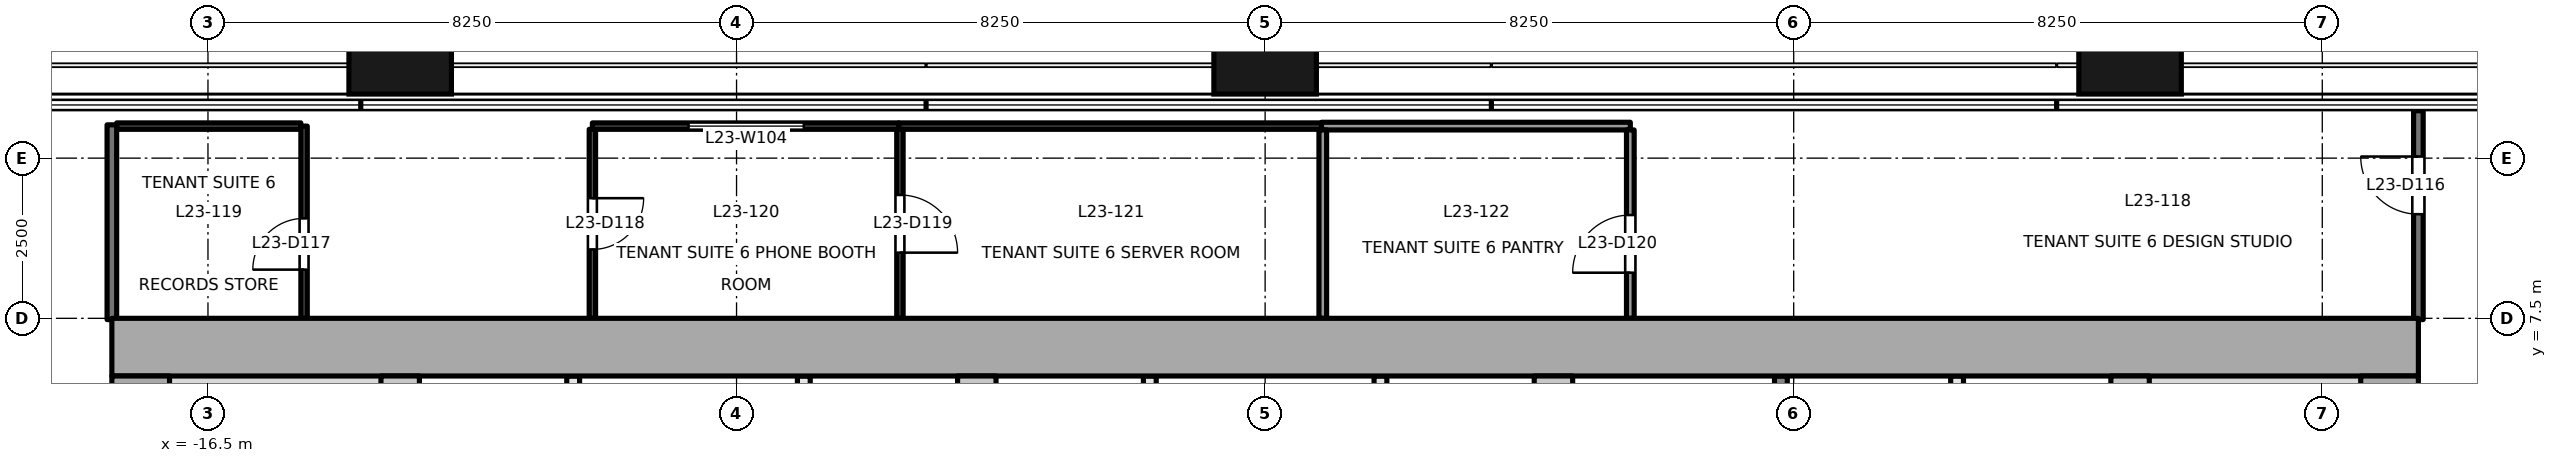
"""IFC4 building model, lengths in metres.
Left out: names, types, materials, properties, quantities, classifications, styles, units other than length and angle.
Written with IfcOpenShell. Run it as: python <this file> out.ifc"""

import sys

from ifc_helpers import new_model, si_unit, direction, frame, frame_2d, origin, origin_2d, place, context, subcontext, project, spatial, rectangle, extrude, element, fill, save


model = new_model("IFC4")
c1 = context("Model", 3, precision=1e-05, world=origin(), true_north=direction((0.0, 1.0)))
c2 = subcontext(c1, "Body", "Model", "MODEL_VIEW")
j1 = project(units=[si_unit("LENGTHUNIT", "METRE"), si_unit("PLANEANGLEUNIT", "RADIAN")], contexts=[c1])
p1 = place(None, origin())
s1 = spatial("IfcSite", under=j1, at=p1, CompositionType="ELEMENT")
p2 = place(p1, origin())
s2 = spatial("IfcBuilding", under=s1, at=p2, CompositionType="ELEMENT")
p3 = place(p2, frame((0.0, 0.0, 103.7)))
s3 = spatial("IfcBuildingStorey", under=s2, at=p3, CompositionType="ELEMENT", Elevation=103.7)
for number, where, z_axis, x_axis in (
    (1, (-13.5, 11.9, -0.2), (0.0, 0.0, 1.0), (1.0, 0.0, 0.0)),
    (2, (0.0, 11.9, -0.2), (0.0, 0.0, 1.0), (1.0, 0.0, 0.0)),
    (3, (13.5, 11.9, -0.2), (0.0, 0.0, 1.0), (1.0, 0.0, 0.0)),
):
    element("IfcColumn", number, at=place(p3, frame(where, z_axis=z_axis, x_axis=x_axis)), inside=s3, PredefinedType="COLUMN", context=c2, shape_type="SweptSolid", body=[
        extrude(rectangle(XDim=1.6, YDim=1.8, at=origin_2d()), origin(), (0.0, 0.0, 1.0), 4.0),
    ])
p4 = place(p3, frame((-18.0, 7.05, -0.2), z_axis=(0.0, 0.0, 1.0), x_axis=(1.0, 0.0, 0.0)))
e4 = element("IfcWall", 4, at=p4, inside=s3, PredefinedType="SHEAR", context=c2, shape_type="SweptSolid", body=[
    extrude(rectangle(XDim=36.0, YDim=0.9, at=frame_2d((18.0, 0.0))), origin(), (0.0, 0.0, 1.0), 4.0),
])
p5 = place(p3, frame((-17.55, -6.6, -0.2), z_axis=(0.0, 0.0, 1.0), x_axis=(0.0, 1.0, 0.0)))
e5 = element("IfcWall", 5, at=p5, inside=s3, PredefinedType="SHEAR", context=c2, shape_type="SweptSolid", body=[
    extrude(rectangle(XDim=13.2, YDim=0.9, at=frame_2d((6.6, 0.0))), origin(), (0.0, 0.0, 1.0), 4.0),
])
p6 = place(p5, frame((4.55, 0.0, 0.2)))
e6 = element("IfcOpeningElement", 6, at=p6, cuts=e5, PredefinedType="OPENING", context=c2, shape_type="SweptSolid", body=[
    extrude(rectangle(XDim=1.2, YDim=2.1, at=frame_2d((0.6, 1.05))), frame((0.0, 0.46, 0.0), z_axis=(0.0, -1.0, 0.0), x_axis=(1.0, 0.0, 0.0)), (0.0, 0.0, 1.0), 0.921),
])
p7 = place(p3, frame((17.55, -6.6, -0.2), z_axis=(0.0, 0.0, 1.0), x_axis=(0.0, 1.0, 0.0)))
e7 = element("IfcWall", 7, at=p7, inside=s3, PredefinedType="SHEAR", context=c2, shape_type="SweptSolid", body=[
    extrude(rectangle(XDim=13.2, YDim=0.9, at=frame_2d((6.6, 0.0))), origin(), (0.0, 0.0, 1.0), 4.0),
])
p8 = place(p7, frame((4.55, 0.0, 0.2)))
e8 = element("IfcOpeningElement", 8, at=p8, cuts=e7, PredefinedType="OPENING", context=c2, shape_type="SweptSolid", body=[
    extrude(rectangle(XDim=1.2, YDim=2.1, at=frame_2d((0.6, 1.05))), frame((0.0, 0.46, 0.0), z_axis=(0.0, -1.0, 0.0), x_axis=(1.0, 0.0, 0.0)), (0.0, 0.0, 1.0), 0.921),
])
for number, where, z_axis, x_axis in (
    (9, (-13.5, -6.6, -0.2), (0.0, 0.0, 1.0), (0.0, 1.0, 0.0)),
    (10, (-4.5, -6.6, -0.2), (0.0, 0.0, 1.0), (0.0, 1.0, 0.0)),
    (11, (4.5, -6.6, -0.2), (0.0, 0.0, 1.0), (0.0, 1.0, 0.0)),
    (12, (13.5, -6.6, -0.2), (0.0, 0.0, 1.0), (0.0, 1.0, 0.0)),
):
    element("IfcWall", number, at=place(p3, frame(where, z_axis=z_axis, x_axis=x_axis)), inside=s3, PredefinedType="SHEAR", context=c2, shape_type="SweptSolid", body=[
        extrude(rectangle(XDim=13.2, YDim=0.6, at=frame_2d((6.6, 0.0))), origin(), (0.0, 0.0, 1.0), 4.0),
    ])
p9 = place(p3, frame((-10.8, -6.6, 0.0), z_axis=(0.0, 0.0, 1.0), x_axis=(0.0, 1.0, 0.0)))
e13 = element("IfcWall", 13, at=p9, inside=s3, PredefinedType="PARTITIONING", context=c2, shape_type="SweptSolid", body=[
    extrude(rectangle(XDim=13.2, YDim=0.2, at=frame_2d((6.6, 0.0))), origin(), (0.0, 0.0, 1.0), 3.8),
])
p10 = place(p9, frame((0.55, 0.0, 0.0)))
e14 = element("IfcOpeningElement", 14, at=p10, cuts=e13, PredefinedType="OPENING", context=c2, shape_type="SweptSolid", body=[
    extrude(rectangle(XDim=0.9, YDim=2.1, at=frame_2d((0.45, 1.05))), frame((0.0, 0.111, 0.0), z_axis=(0.0, -1.0, 0.0), x_axis=(1.0, 0.0, 0.0)), (0.0, 0.0, 1.0), 0.221),
])
p11 = place(p9, frame((2.9, 0.0, 0.0)))
e15 = element("IfcOpeningElement", 15, at=p11, cuts=e13, PredefinedType="OPENING", context=c2, shape_type="SweptSolid", body=[
    extrude(rectangle(XDim=1.2, YDim=2.1, at=frame_2d((0.6, 1.05))), frame((0.0, 0.111, 0.0), z_axis=(0.0, -1.0, 0.0), x_axis=(1.0, 0.0, 0.0)), (0.0, 0.0, 1.0), 0.221),
])
p12 = place(p9, frame((5.7, 0.0, 0.0)))
e16 = element("IfcOpeningElement", 16, at=p12, cuts=e13, PredefinedType="OPENING", context=c2, shape_type="SweptSolid", body=[
    extrude(rectangle(XDim=1.2, YDim=2.1, at=frame_2d((0.6, 1.05))), frame((0.0, 0.111, 0.0), z_axis=(0.0, -1.0, 0.0), x_axis=(1.0, 0.0, 0.0)), (0.0, 0.0, 1.0), 0.221),
])
p13 = place(p9, frame((8.5, 0.0, 0.0)))
e17 = element("IfcOpeningElement", 17, at=p13, cuts=e13, PredefinedType="OPENING", context=c2, shape_type="SweptSolid", body=[
    extrude(rectangle(XDim=1.2, YDim=2.1, at=frame_2d((0.6, 1.05))), frame((0.0, 0.111, 0.0), z_axis=(0.0, -1.0, 0.0), x_axis=(1.0, 0.0, 0.0)), (0.0, 0.0, 1.0), 0.221),
])
p14 = place(p9, frame((11.3, 0.0, 0.0)))
e18 = element("IfcOpeningElement", 18, at=p14, cuts=e13, PredefinedType="OPENING", context=c2, shape_type="SweptSolid", body=[
    extrude(rectangle(XDim=1.2, YDim=2.1, at=frame_2d((0.6, 1.05))), frame((0.0, 0.111, 0.0), z_axis=(0.0, -1.0, 0.0), x_axis=(1.0, 0.0, 0.0)), (0.0, 0.0, 1.0), 0.221),
])
p15 = place(p3, frame((-7.2, -6.6, 0.0), z_axis=(0.0, 0.0, 1.0), x_axis=(0.0, 1.0, 0.0)))
e19 = element("IfcWall", 19, at=p15, inside=s3, PredefinedType="PARTITIONING", context=c2, shape_type="SweptSolid", body=[
    extrude(rectangle(XDim=13.2, YDim=0.2, at=frame_2d((6.6, 0.0))), origin(), (0.0, 0.0, 1.0), 3.8),
])
p16 = place(p15, frame((0.55, 0.0, 0.0)))
e20 = element("IfcOpeningElement", 20, at=p16, cuts=e19, PredefinedType="OPENING", context=c2, shape_type="SweptSolid", body=[
    extrude(rectangle(XDim=0.9, YDim=2.1, at=frame_2d((0.45, 1.05))), frame((0.0, 0.111, 0.0), z_axis=(0.0, -1.0, 0.0), x_axis=(1.0, 0.0, 0.0)), (0.0, 0.0, 1.0), 0.221),
])
p17 = place(p15, frame((2.9, 0.0, 0.0)))
e21 = element("IfcOpeningElement", 21, at=p17, cuts=e19, PredefinedType="OPENING", context=c2, shape_type="SweptSolid", body=[
    extrude(rectangle(XDim=1.2, YDim=2.1, at=frame_2d((0.6, 1.05))), frame((0.0, 0.111, 0.0), z_axis=(0.0, -1.0, 0.0), x_axis=(1.0, 0.0, 0.0)), (0.0, 0.0, 1.0), 0.221),
])
p18 = place(p15, frame((5.7, 0.0, 0.0)))
e22 = element("IfcOpeningElement", 22, at=p18, cuts=e19, PredefinedType="OPENING", context=c2, shape_type="SweptSolid", body=[
    extrude(rectangle(XDim=1.2, YDim=2.1, at=frame_2d((0.6, 1.05))), frame((0.0, 0.111, 0.0), z_axis=(0.0, -1.0, 0.0), x_axis=(1.0, 0.0, 0.0)), (0.0, 0.0, 1.0), 0.221),
])
p19 = place(p15, frame((8.5, 0.0, 0.0)))
e23 = element("IfcOpeningElement", 23, at=p19, cuts=e19, PredefinedType="OPENING", context=c2, shape_type="SweptSolid", body=[
    extrude(rectangle(XDim=1.2, YDim=2.1, at=frame_2d((0.6, 1.05))), frame((0.0, 0.111, 0.0), z_axis=(0.0, -1.0, 0.0), x_axis=(1.0, 0.0, 0.0)), (0.0, 0.0, 1.0), 0.221),
])
p20 = place(p15, frame((11.3, 0.0, 0.0)))
e24 = element("IfcOpeningElement", 24, at=p20, cuts=e19, PredefinedType="OPENING", context=c2, shape_type="SweptSolid", body=[
    extrude(rectangle(XDim=1.2, YDim=2.1, at=frame_2d((0.6, 1.05))), frame((0.0, 0.111, 0.0), z_axis=(0.0, -1.0, 0.0), x_axis=(1.0, 0.0, 0.0)), (0.0, 0.0, 1.0), 0.221),
])
p21 = place(p3, frame((-1.8, -6.6, 0.0), z_axis=(0.0, 0.0, 1.0), x_axis=(0.0, 1.0, 0.0)))
e25 = element("IfcWall", 25, at=p21, inside=s3, PredefinedType="PARTITIONING", context=c2, shape_type="SweptSolid", body=[
    extrude(rectangle(XDim=13.2, YDim=0.2, at=frame_2d((6.6, 0.0))), origin(), (0.0, 0.0, 1.0), 3.8),
])
p22 = place(p21, frame((0.55, 0.0, 0.0)))
e26 = element("IfcOpeningElement", 26, at=p22, cuts=e25, PredefinedType="OPENING", context=c2, shape_type="SweptSolid", body=[
    extrude(rectangle(XDim=0.9, YDim=2.1, at=frame_2d((0.45, 1.05))), frame((0.0, 0.111, 0.0), z_axis=(0.0, -1.0, 0.0), x_axis=(1.0, 0.0, 0.0)), (0.0, 0.0, 1.0), 0.221),
])
p23 = place(p3, frame((1.8, -6.6, 0.0), z_axis=(0.0, 0.0, 1.0), x_axis=(0.0, 1.0, 0.0)))
e27 = element("IfcWall", 27, at=p23, inside=s3, PredefinedType="PARTITIONING", context=c2, shape_type="SweptSolid", body=[
    extrude(rectangle(XDim=13.2, YDim=0.2, at=frame_2d((6.6, 0.0))), origin(), (0.0, 0.0, 1.0), 3.8),
])
p24 = place(p23, frame((0.55, 0.0, 0.0)))
e28 = element("IfcOpeningElement", 28, at=p24, cuts=e27, PredefinedType="OPENING", context=c2, shape_type="SweptSolid", body=[
    extrude(rectangle(XDim=0.9, YDim=2.1, at=frame_2d((0.45, 1.05))), frame((0.0, 0.111, 0.0), z_axis=(0.0, -1.0, 0.0), x_axis=(1.0, 0.0, 0.0)), (0.0, 0.0, 1.0), 0.221),
])
p25 = place(p3, frame((8.05, -6.6, 0.0), z_axis=(0.0, 0.0, 1.0), x_axis=(0.0, 1.0, 0.0)))
e29 = element("IfcWall", 29, at=p25, inside=s3, PredefinedType="PARTITIONING", context=c2, shape_type="SweptSolid", body=[
    extrude(rectangle(XDim=13.2, YDim=0.2, at=frame_2d((6.6, 0.0))), origin(), (0.0, 0.0, 1.0), 3.8),
])
p26 = place(p25, frame((0.91, 0.0, 0.0)))
e30 = element("IfcOpeningElement", 30, at=p26, cuts=e29, PredefinedType="OPENING", context=c2, shape_type="SweptSolid", body=[
    extrude(rectangle(XDim=0.9, YDim=2.1, at=frame_2d((0.45, 1.05))), frame((0.0, 0.111, 0.0), z_axis=(0.0, -1.0, 0.0), x_axis=(1.0, 0.0, 0.0)), (0.0, 0.0, 1.0), 0.221),
])
p27 = place(p25, frame((3.46, 0.0, 0.0)))
e31 = element("IfcOpeningElement", 31, at=p27, cuts=e29, PredefinedType="OPENING", context=c2, shape_type="SweptSolid", body=[
    extrude(rectangle(XDim=0.9, YDim=2.1, at=frame_2d((0.45, 1.05))), frame((0.0, 0.111, 0.0), z_axis=(0.0, -1.0, 0.0), x_axis=(1.0, 0.0, 0.0)), (0.0, 0.0, 1.0), 0.221),
])
p28 = place(p25, frame((5.5, 0.0, 0.0)))
e32 = element("IfcOpeningElement", 32, at=p28, cuts=e29, PredefinedType="OPENING", context=c2, shape_type="SweptSolid", body=[
    extrude(rectangle(XDim=0.9, YDim=2.1, at=frame_2d((0.45, 1.05))), frame((0.0, 0.111, 0.0), z_axis=(0.0, -1.0, 0.0), x_axis=(1.0, 0.0, 0.0)), (0.0, 0.0, 1.0), 0.221),
])
p29 = place(p25, frame((11.9, 0.0, 0.0)))
e33 = element("IfcOpeningElement", 33, at=p29, cuts=e29, PredefinedType="OPENING", context=c2, shape_type="SweptSolid", body=[
    extrude(rectangle(XDim=1.1, YDim=2.1, at=frame_2d((0.55, 1.05))), frame((0.0, 0.111, 0.0), z_axis=(0.0, -1.0, 0.0), x_axis=(1.0, 0.0, 0.0)), (0.0, 0.0, 1.0), 0.221),
])
p30 = place(p3, frame((10.8, -6.6, 0.0), z_axis=(0.0, 0.0, 1.0), x_axis=(0.0, 1.0, 0.0)))
e34 = element("IfcWall", 34, at=p30, inside=s3, PredefinedType="PARTITIONING", context=c2, shape_type="SweptSolid", body=[
    extrude(rectangle(XDim=13.2, YDim=0.2, at=frame_2d((6.6, 0.0))), origin(), (0.0, 0.0, 1.0), 3.8),
])
p31 = place(p30, frame((0.7, 0.0, 0.0)))
e35 = element("IfcOpeningElement", 35, at=p31, cuts=e34, PredefinedType="OPENING", context=c2, shape_type="SweptSolid", body=[
    extrude(rectangle(XDim=1.2, YDim=2.1, at=frame_2d((0.6, 1.05))), frame((0.0, 0.111, 0.0), z_axis=(0.0, -1.0, 0.0), x_axis=(1.0, 0.0, 0.0)), (0.0, 0.0, 1.0), 0.221),
])
p32 = place(p30, frame((9.15, 0.0, 0.0)))
e36 = element("IfcOpeningElement", 36, at=p32, cuts=e34, PredefinedType="OPENING", context=c2, shape_type="SweptSolid", body=[
    extrude(rectangle(XDim=0.9, YDim=2.1, at=frame_2d((0.45, 1.05))), frame((0.0, 0.111, 0.0), z_axis=(0.0, -1.0, 0.0), x_axis=(1.0, 0.0, 0.0)), (0.0, 0.0, 1.0), 0.221),
])
p33 = place(p30, frame((11.55, 0.0, 0.0)))
e37 = element("IfcOpeningElement", 37, at=p33, cuts=e34, PredefinedType="OPENING", context=c2, shape_type="SweptSolid", body=[
    extrude(rectangle(XDim=0.9, YDim=2.1, at=frame_2d((0.45, 1.05))), frame((0.0, 0.111, 0.0), z_axis=(0.0, -1.0, 0.0), x_axis=(1.0, 0.0, 0.0)), (0.0, 0.0, 1.0), 0.221),
])
p34 = place(p3, frame((18.0, 7.48, 0.0), z_axis=(0.0, 0.0, 1.0), x_axis=(0.0, 1.0, 0.0)))
e38 = element("IfcWall", 38, at=p34, inside=s3, PredefinedType="PARTITIONING", context=c2, shape_type="SweptSolid", body=[
    extrude(rectangle(XDim=3.26, YDim=0.15, at=frame_2d((1.63, 0.0))), origin(), (0.0, 0.0, 1.0), 2.8),
])
p35 = place(p34, frame((1.645, 0.0, 0.0)))
e39 = element("IfcOpeningElement", 39, at=p35, cuts=e38, PredefinedType="OPENING", context=c2, shape_type="SweptSolid", body=[
    extrude(rectangle(XDim=0.9, YDim=2.1, at=frame_2d((0.45, 1.05))), frame((0.0, 0.085, 0.0), z_axis=(0.0, -1.0, 0.0), x_axis=(1.0, 0.0, 0.0)), (0.0, 0.0, 1.0), 0.171),
])
p36 = place(p3, frame((-18.0, 10.52, 0.0), z_axis=(0.0, 0.0, 1.0), x_axis=(0.0, -1.0, 0.0)))
e40 = element("IfcWall", 40, at=p36, inside=s3, PredefinedType="PARTITIONING", context=c2, shape_type="SweptSolid", body=[
    extrude(rectangle(XDim=3.04, YDim=0.15, at=frame_2d((1.52, 0.0))), origin(), (0.0, 0.0, 1.0), 3.8),
])
p37 = place(p3, frame((-15.05, 10.5, 0.0), z_axis=(0.0, 0.0, 1.0), x_axis=(-1.0, 0.0, 0.0)))
e41 = element("IfcWall", 41, at=p37, inside=s3, PredefinedType="PARTITIONING", context=c2, shape_type="SweptSolid", body=[
    extrude(rectangle(XDim=2.875, YDim=0.1, at=frame_2d((1.438, 0.0))), origin(), (0.0, 0.0, 1.0), 3.8),
])
p38 = place(p3, frame((-15.0, 7.5, 0.0), z_axis=(0.0, 0.0, 1.0), x_axis=(0.0, 1.0, 0.0)))
e42 = element("IfcWall", 42, at=p38, inside=s3, PredefinedType="PARTITIONING", context=c2, shape_type="SweptSolid", body=[
    extrude(rectangle(XDim=3.0, YDim=0.1, at=frame_2d((1.5, 0.0))), origin(), (0.0, 0.0, 1.0), 3.8),
])
p39 = place(p38, frame((0.76, 0.0, 0.0)))
e43 = element("IfcOpeningElement", 43, at=p39, cuts=e42, PredefinedType="OPENING", context=c2, shape_type="SweptSolid", body=[
    extrude(rectangle(XDim=0.8, YDim=2.1, at=frame_2d((0.4, 1.05))), frame((0.0, 0.061, 0.0), z_axis=(0.0, -1.0, 0.0), x_axis=(1.0, 0.0, 0.0)), (0.0, 0.0, 1.0), 0.121),
])
p40 = place(p3, frame((-10.5, 10.45, 0.0), z_axis=(0.0, 0.0, 1.0), x_axis=(0.0, -1.0, 0.0)))
e44 = element("IfcWall", 44, at=p40, inside=s3, PredefinedType="PARTITIONING", context=c2, shape_type="SweptSolid", body=[
    extrude(rectangle(XDim=2.95, YDim=0.1, at=frame_2d((1.475, 0.0))), origin(), (0.0, 0.0, 1.0), 3.8),
])
p41 = place(p40, frame((1.075, 0.0, 0.0)))
e45 = element("IfcOpeningElement", 45, at=p41, cuts=e44, PredefinedType="OPENING", context=c2, shape_type="SweptSolid", body=[
    extrude(rectangle(XDim=0.8, YDim=2.1, at=frame_2d((0.4, 1.05))), frame((0.0, 0.061, 0.0), z_axis=(0.0, -1.0, 0.0), x_axis=(1.0, 0.0, 0.0)), (0.0, 0.0, 1.0), 0.121),
])
p42 = place(p3, frame((-5.72, 10.5, 0.0), z_axis=(0.0, 0.0, 1.0), x_axis=(-1.0, 0.0, 0.0)))
e46 = element("IfcWall", 46, at=p42, inside=s3, PredefinedType="PARTITIONING", context=c2, shape_type="SweptSolid", body=[
    extrude(rectangle(XDim=4.78, YDim=0.1, at=frame_2d((2.39, 0.0))), origin(), (0.0, 0.0, 1.0), 3.5),
])
p43 = place(p42, frame((1.48, 0.0, 0.9)))
e47 = element("IfcOpeningElement", 47, at=p43, cuts=e46, PredefinedType="OPENING", context=c2, shape_type="SweptSolid", body=[
    extrude(rectangle(XDim=1.8, YDim=1.2, at=frame_2d((0.9, 0.6))), frame((0.0, 0.061, 0.0), z_axis=(0.0, -1.0, 0.0), x_axis=(1.0, 0.0, 0.0)), (0.0, 0.0, 1.0), 0.121),
])
p44 = place(p3, frame((0.88, 10.5, 0.0), z_axis=(0.0, 0.0, 1.0), x_axis=(-1.0, 0.0, 0.0)))
e48 = element("IfcWall", 48, at=p44, inside=s3, PredefinedType="PARTITIONING", context=c2, shape_type="SweptSolid", body=[
    extrude(rectangle(XDim=6.6, YDim=0.1, at=frame_2d((3.3, 0.0))), origin(), (0.0, 0.0, 1.0), 3.5),
])
p45 = place(p3, frame((5.7, 10.5, 0.0), z_axis=(0.0, 0.0, 1.0), x_axis=(-1.0, 0.0, 0.0)))
e49 = element("IfcWall", 49, at=p45, inside=s3, PredefinedType="PARTITIONING", context=c2, shape_type="SweptSolid", body=[
    extrude(rectangle(XDim=4.82, YDim=0.12, at=frame_2d((2.41, 0.0))), origin(), (0.0, 0.0, 1.0), 3.5),
])
p46 = place(p3, frame((5.7, 7.5, 0.0), z_axis=(0.0, 0.0, 1.0), x_axis=(0.0, 1.0, 0.0)))
e50 = element("IfcWall", 50, at=p46, inside=s3, PredefinedType="PARTITIONING", context=c2, shape_type="SweptSolid", body=[
    extrude(rectangle(XDim=2.94, YDim=0.12, at=frame_2d((1.47, 0.0))), origin(), (0.0, 0.0, 1.0), 3.8),
])
p47 = place(p46, frame((0.712, 0.0, 0.0)))
e51 = element("IfcOpeningElement", 51, at=p47, cuts=e50, PredefinedType="OPENING", context=c2, shape_type="SweptSolid", body=[
    extrude(rectangle(XDim=0.9, YDim=2.1, at=frame_2d((0.45, 1.05))), frame((0.0, 0.071, 0.0), z_axis=(0.0, -1.0, 0.0), x_axis=(1.0, 0.0, 0.0)), (0.0, 0.0, 1.0), 0.141),
])
p48 = place(p3, frame((-5.7, 10.45, 0.0), z_axis=(0.0, 0.0, 1.0), x_axis=(0.0, -1.0, 0.0)))
e52 = element("IfcWall", 52, at=p48, inside=s3, PredefinedType="PARTITIONING", context=c2, shape_type="SweptSolid", body=[
    extrude(rectangle(XDim=2.95, YDim=0.1, at=frame_2d((1.475, 0.0))), origin(), (0.0, 0.0, 1.0), 3.8),
])
p49 = place(p48, frame((1.025, 0.0, 0.0)))
e53 = element("IfcOpeningElement", 53, at=p49, cuts=e52, PredefinedType="OPENING", context=c2, shape_type="SweptSolid", body=[
    extrude(rectangle(XDim=0.9, YDim=2.1, at=frame_2d((0.45, 1.05))), frame((0.0, 0.061, 0.0), z_axis=(0.0, -1.0, 0.0), x_axis=(1.0, 0.0, 0.0)), (0.0, 0.0, 1.0), 0.121),
])
p50 = place(p3, frame((0.9, 10.44, 0.0), z_axis=(0.0, 0.0, 1.0), x_axis=(0.0, -1.0, 0.0)))
e54 = element("IfcWall", 54, at=p50, inside=s3, PredefinedType="PARTITIONING", context=c2, shape_type="SweptSolid", body=[
    extrude(rectangle(XDim=2.94, YDim=0.12, at=frame_2d((1.47, 0.0))), origin(), (0.0, 0.0, 1.0), 3.8),
])
p51 = place(p35, origin())
e55 = element("IfcDoor", 55, at=p51, inside=s3, OperationType="SINGLE_SWING_RIGHT", PredefinedType="DOOR", context=c2, shape_type="SweptSolid", body=[
    extrude(rectangle(XDim=0.9, YDim=2.1, at=frame_2d((0.45, 1.05))), frame((0.0, 0.025, 0.0), z_axis=(0.0, -1.0, 0.0), x_axis=(1.0, 0.0, 0.0)), (0.0, 0.0, 1.0), 0.05),
])
fill(e39, e55)
p52 = place(p39, origin())
e56 = element("IfcDoor", 56, at=p52, inside=s3, OperationType="SINGLE_SWING_LEFT", PredefinedType="DOOR", context=c2, shape_type="SweptSolid", body=[
    extrude(rectangle(XDim=0.8, YDim=2.1, at=frame_2d((0.4, 1.05))), frame((0.0, 0.025, 0.0), z_axis=(0.0, -1.0, 0.0), x_axis=(1.0, 0.0, 0.0)), (0.0, 0.0, 1.0), 0.05),
])
fill(e43, e56)
p53 = place(p41, origin())
e57 = element("IfcDoor", 57, at=p53, inside=s3, OperationType="SINGLE_SWING_LEFT", PredefinedType="DOOR", context=c2, shape_type="SweptSolid", body=[
    extrude(rectangle(XDim=0.8, YDim=2.1, at=frame_2d((0.4, 1.05))), frame((0.0, 0.025, 0.0), z_axis=(0.0, -1.0, 0.0), x_axis=(1.0, 0.0, 0.0)), (0.0, 0.0, 1.0), 0.05),
])
fill(e45, e57)
p54 = place(p49, origin())
e58 = element("IfcDoor", 58, at=p54, inside=s3, OperationType="SINGLE_SWING_RIGHT", PredefinedType="DOOR", context=c2, shape_type="SweptSolid", body=[
    extrude(rectangle(XDim=0.9, YDim=2.1, at=frame_2d((0.45, 1.05))), frame((0.0, 0.025, 0.0), z_axis=(0.0, -1.0, 0.0), x_axis=(1.0, 0.0, 0.0)), (0.0, 0.0, 1.0), 0.05),
])
fill(e53, e58)
p55 = place(p47, origin())
e59 = element("IfcDoor", 59, at=p55, inside=s3, OperationType="SINGLE_SWING_LEFT", PredefinedType="DOOR", context=c2, shape_type="SweptSolid", body=[
    extrude(rectangle(XDim=0.9, YDim=2.1, at=frame_2d((0.45, 1.05))), frame((0.0, 0.025, 0.0), z_axis=(0.0, -1.0, 0.0), x_axis=(1.0, 0.0, 0.0)), (0.0, 0.0, 1.0), 0.05),
])
fill(e51, e59)
p56 = place(p43, origin())
e60 = element("IfcWindow", 60, at=p56, inside=s3, PartitioningType="SINGLE_PANEL", PredefinedType="WINDOW", context=c2, shape_type="SweptSolid", body=[
    extrude(rectangle(XDim=1.8, YDim=1.2, at=frame_2d((0.9, 0.6))), frame((0.0, 0.03, 0.0), z_axis=(0.0, -1.0, 0.0), x_axis=(1.0, 0.0, 0.0)), (0.0, 0.0, 1.0), 0.06),
])
fill(e47, e60)
save(model, sys.argv[1])
